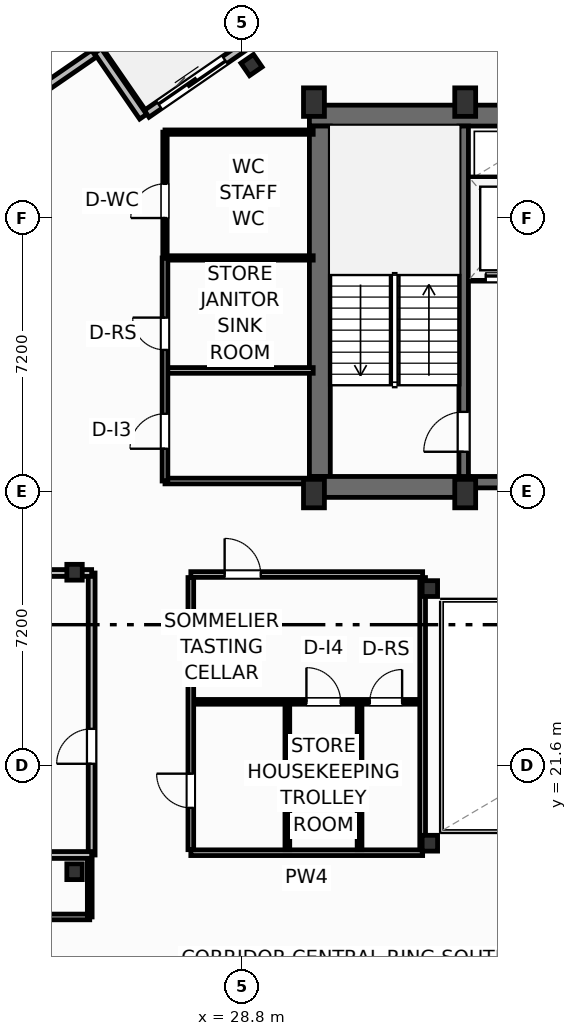
"""IFC4 building model, lengths in metres.
Left out: names, types, materials, properties, quantities, classifications, styles, units other than length and angle.
Written with IfcOpenShell. Run it as: python <this file> out.ifc"""

import sys

from ifc_helpers import new_model, si_unit, direction, frame, frame_2d, origin, origin_2d, place, context, subcontext, project, spatial, rectangle, i_section, extrude, element, fill, save


model = new_model("IFC4")
c1 = context("Model", 3, precision=1e-05, world=origin(), true_north=direction((0.0, 1.0)))
c2 = subcontext(c1, "Body", "Model", "MODEL_VIEW")
j1 = project(units=[si_unit("LENGTHUNIT", "METRE"), si_unit("PLANEANGLEUNIT", "RADIAN")], contexts=[c1])
p1 = place(None, origin())
s1 = spatial("IfcSite", under=j1, at=p1, CompositionType="ELEMENT")
p2 = place(p1, origin())
s2 = spatial("IfcBuilding", under=s1, at=p2, CompositionType="ELEMENT")
p3 = place(p2, frame((0.0, 0.0, 258.2)))
s3 = spatial("IfcBuildingStorey", under=s2, at=p3, CompositionType="ELEMENT", Elevation=258.2)
for number, where, z_axis, x_axis in (
    (1, (30.7, 28.75, 0.0), (0.0, 0.0, 1.0), (1.0, 0.0, 0.0)),
    (2, (34.68, 28.75, 0.0), (0.0, 0.0, 1.0), (1.0, 0.0, 0.0)),
    (3, (30.7, 39.05, 0.0), (0.0, 0.0, 1.0), (1.0, 0.0, 0.0)),
    (4, (34.68, 39.05, 0.0), (0.0, 0.0, 1.0), (1.0, 0.0, 0.0)),
):
    element("IfcColumn", number, at=place(p3, frame(where, z_axis=z_axis, x_axis=x_axis)), inside=s3, PredefinedType="COLUMN", context=c2, shape_type="SweptSolid", body=[
        extrude(rectangle(XDim=0.55, YDim=0.75, at=origin_2d()), origin(), (0.0, 0.0, 1.0), 3.7),
    ])
for number, where, z_axis, x_axis in (
    (5, (33.75, 19.55, 0.0), (0.0, 0.0, 1.0), (1.0, 0.0, 0.0)),
    (6, (33.75, 26.25, 0.0), (0.0, 0.0, 1.0), (1.0, 0.0, 0.0)),
    (7, (24.4, 18.8, 0.0), (0.0, 0.0, 1.0), (1.0, 0.0, 0.0)),
    (8, (24.4, 26.68, 0.0), (0.0, 0.0, 1.0), (1.0, 0.0, 0.0)),
):
    element("IfcColumn", number, at=place(p3, frame(where, z_axis=z_axis, x_axis=x_axis)), inside=s3, PredefinedType="COLUMN", context=c2, shape_type="SweptSolid", body=[
        extrude(i_section(OverallWidth=0.406, OverallDepth=0.416, WebThickness=0.03, FlangeThickness=0.048, FilletRadius=0.025, at=origin_2d()), origin(), (0.0, 0.0, 1.0), 3.7),
    ])
p4 = place(p3, frame((30.58, 38.695, 0.0), z_axis=(0.0, 0.0, 1.0), x_axis=(1.0, 0.0, 0.0)))
e9 = element("IfcWall", 9, at=p4, inside=s3, PredefinedType="SHEAR", context=c2, shape_type="SweptSolid", body=[
    extrude(rectangle(XDim=17.24, YDim=0.55, at=frame_2d((8.62, 0.0))), origin(), (0.0, 0.0, 1.0), 3.45),
])
p5 = place(p3, frame((30.855, 29.2, 0.0), z_axis=(0.0, 0.0, 1.0), x_axis=(0.0, 1.0, 0.0)))
e10 = element("IfcWall", 10, at=p5, inside=s3, PredefinedType="SHEAR", context=c2, shape_type="SweptSolid", body=[
    extrude(rectangle(XDim=9.22, YDim=0.55, at=frame_2d((4.61, 0.0))), origin(), (0.0, 0.0, 1.0), 3.45),
])
p6 = place(p3, frame((30.58, 28.925, 0.0), z_axis=(0.0, 0.0, 1.0), x_axis=(1.0, 0.0, 0.0)))
e11 = element("IfcWall", 11, at=p6, inside=s3, PredefinedType="SHEAR", context=c2, shape_type="SweptSolid", body=[
    extrude(rectangle(XDim=4.22, YDim=0.55, at=frame_2d((2.11, 0.0))), origin(), (0.0, 0.0, 1.0), 3.45),
])
p7 = place(p3, frame((34.8, 29.05, 0.0), z_axis=(0.0, 0.0, 1.0), x_axis=(1.0, 0.0, 0.0)))
e12 = element("IfcWall", 12, at=p7, inside=s3, PredefinedType="SHEAR", context=c2, shape_type="SweptSolid", body=[
    extrude(rectangle(XDim=8.8, YDim=0.3, at=frame_2d((4.4, 0.0))), origin(), (0.0, 0.0, 1.0), 3.45),
])
p8 = place(p7, frame((0.95, 0.0, 0.0)))
e13 = element("IfcOpeningElement", 13, at=p8, cuts=e12, PredefinedType="OPENING", context=c2, shape_type="SweptSolid", body=[
    extrude(rectangle(XDim=1.1, YDim=2.15, at=frame_2d((0.55, 1.075))), frame((0.0, 0.16, 0.0), z_axis=(0.0, -1.0, 0.0), x_axis=(1.0, 0.0, 0.0)), (0.0, 0.0, 1.0), 0.32),
])
p9 = place(p7, frame((6.75, 0.0, 0.0)))
e14 = element("IfcOpeningElement", 14, at=p9, cuts=e12, PredefinedType="OPENING", context=c2, shape_type="SweptSolid", body=[
    extrude(rectangle(XDim=1.1, YDim=2.15, at=frame_2d((0.55, 1.075))), frame((0.0, 0.16, 0.0), z_axis=(0.0, -1.0, 0.0), x_axis=(1.0, 0.0, 0.0)), (0.0, 0.0, 1.0), 0.32),
])
p10 = place(p7, frame((4.45, 0.0, 0.0)))
e15 = element("IfcOpeningElement", 15, at=p10, cuts=e12, PredefinedType="OPENING", context=c2, shape_type="SweptSolid", body=[
    extrude(rectangle(XDim=0.95, YDim=2.15, at=frame_2d((0.475, 1.075))), frame((0.0, 0.16, 0.0), z_axis=(0.0, -1.0, 0.0), x_axis=(1.0, 0.0, 0.0)), (0.0, 0.0, 1.0), 0.32),
])
p11 = place(p3, frame((34.64, 29.2, 0.0), z_axis=(0.0, 0.0, 1.0), x_axis=(0.0, 1.0, 0.0)))
e16 = element("IfcWall", 16, at=p11, inside=s3, PredefinedType="SHEAR", context=c2, shape_type="SweptSolid", body=[
    extrude(rectangle(XDim=9.22, YDim=0.25, at=frame_2d((4.61, 0.0))), origin(), (0.0, 0.0, 1.0), 3.45),
])
p12 = place(p11, frame((0.65, 0.0, 0.0)))
e17 = element("IfcOpeningElement", 17, at=p12, cuts=e16, PredefinedType="OPENING", context=c2, shape_type="SweptSolid", body=[
    extrude(rectangle(XDim=1.05, YDim=2.15, at=frame_2d((0.525, 1.075))), frame((0.0, 0.135, 0.0), z_axis=(0.0, -1.0, 0.0), x_axis=(1.0, 0.0, 0.0)), (0.0, 0.0, 1.0), 0.27),
])
p13 = place(p3, frame((29.057, 40.025, 0.0), z_axis=(0.0, 0.0, 1.0), x_axis=(0.823532597628, 0.567268949127, 0.0)))
e18 = element("IfcColumn", 18, at=p13, inside=s3, PredefinedType="COLUMN", context=c2, shape_type="SweptSolid", body=[
    extrude(i_section(OverallWidth=0.401, OverallDepth=0.399, WebThickness=0.025, FlangeThickness=0.04, FilletRadius=0.022, at=origin_2d()), origin(), (0.0, 0.0, 1.0), 3.7),
])
p14 = place(p3, frame((26.297, 38.743, 0.0), z_axis=(0.0, 0.0, 1.0), x_axis=(0.823534636215, 0.567265989598, 0.0)))
e19 = element("IfcWall", 19, at=p14, inside=s3, PredefinedType="SOLIDWALL", context=c2, shape_type="SweptSolid", body=[
    extrude(rectangle(XDim=6.0, YDim=0.22, at=frame_2d((3.0, 0.0))), origin(), (0.0, 0.0, 1.0), 2.73),
])
p15 = place(p14, frame((0.4, 0.0, 0.0)))
e20 = element("IfcOpeningElement", 20, at=p15, cuts=e19, PredefinedType="OPENING", context=c2, shape_type="SweptSolid", body=[
    extrude(rectangle(XDim=2.1, YDim=2.3, at=frame_2d((1.05, 1.15))), frame((0.0, 0.12, 0.0), z_axis=(0.0, -1.0, 0.0), x_axis=(1.0, 0.0, 0.0)), (0.0, 0.0, 1.0), 0.24),
])
p16 = place(p3, frame((26.204, 38.667, 0.0), z_axis=(0.0, 0.0, 1.0), x_axis=(-0.567219383419, 0.823566737474, 0.0)))
e21 = element("IfcWall", 21, at=p16, inside=s3, PredefinedType="SOLIDWALL", context=c2, shape_type="SweptSolid", body=[
    extrude(rectangle(XDim=2.1, YDim=0.22, at=frame_2d((1.05, 0.0))), origin(), (0.0, 0.0, 1.0), 2.73),
])
p17 = place(p3, frame((24.91, 40.325, 0.0), z_axis=(0.0, 0.0, 1.0), x_axis=(-0.823521165086, -0.56728554596, 0.0)))
e22 = element("IfcWall", 22, at=p17, inside=s3, PredefinedType="SOLIDWALL", context=c2, shape_type="SweptSolid", body=[
    extrude(rectangle(XDim=8.035, YDim=0.22, at=frame_2d((4.018, 0.0))), origin(), (0.0, 0.0, 1.0), 2.73),
])
p18 = place(p17, frame((2.968, 0.0, 0.8)))
e23 = element("IfcOpeningElement", 23, at=p18, cuts=e22, PredefinedType="OPENING", context=c2, shape_type="SweptSolid", body=[
    extrude(rectangle(XDim=2.1, YDim=1.75, at=frame_2d((1.05, 0.875))), frame((0.0, 0.12, 0.0), z_axis=(0.0, -1.0, 0.0), x_axis=(1.0, 0.0, 0.0)), (0.0, 0.0, 1.0), 0.24),
])
p19 = place(p3, frame((5.0, 17.61, 0.0), z_axis=(0.0, 0.0, 1.0), x_axis=(1.0, 0.0, 0.0)))
e24 = element("IfcWall", 24, at=p19, inside=s3, PredefinedType="PARTITIONING", context=c2, shape_type="SweptSolid", body=[
    extrude(rectangle(XDim=19.8, YDim=0.15, at=frame_2d((9.9, 0.0))), origin(), (0.0, 0.0, 1.0), 2.739),
])
p20 = place(p19, frame((16.335, 0.0, 0.0)))
e25 = element("IfcOpeningElement", 25, at=p20, cuts=e24, PredefinedType="OPENING", context=c2, shape_type="SweptSolid", body=[
    extrude(rectangle(XDim=0.92, YDim=2.05, at=frame_2d((0.46, 1.025))), frame((0.0, 0.085, 0.0), z_axis=(0.0, -1.0, 0.0), x_axis=(1.0, 0.0, 0.0)), (0.0, 0.0, 1.0), 0.17),
])
p21 = place(p3, frame((24.8, 17.61, 0.0), z_axis=(0.0, 0.0, 1.0), x_axis=(0.0, 1.0, 0.0)))
e26 = element("IfcWall", 26, at=p21, inside=s3, PredefinedType="PARTITIONING", context=c2, shape_type="SweptSolid", body=[
    extrude(rectangle(XDim=1.63, YDim=0.125, at=frame_2d((0.815, 0.0))), origin(), (0.0, 0.0, 1.0), 3.45),
])
p22 = place(p3, frame((24.85, 19.24, 0.0), z_axis=(0.0, 0.0, 1.0), x_axis=(0.0, 1.0, 0.0)))
e27 = element("IfcWall", 27, at=p22, inside=s3, PredefinedType="PARTITIONING", context=c2, shape_type="SweptSolid", body=[
    extrude(rectangle(XDim=7.42, YDim=0.18, at=frame_2d((3.71, 0.0))), origin(), (0.0, 0.0, 1.0), 3.45),
])
p23 = place(p22, frame((2.4, 0.0, 0.0)))
e28 = element("IfcOpeningElement", 28, at=p23, cuts=e27, PredefinedType="OPENING", context=c2, shape_type="SweptSolid", body=[
    extrude(rectangle(XDim=0.92, YDim=2.05, at=frame_2d((0.46, 1.025))), frame((0.0, 0.1, 0.0), z_axis=(0.0, -1.0, 0.0), x_axis=(1.0, 0.0, 0.0)), (0.0, 0.0, 1.0), 0.2),
])
p24 = place(p3, frame((19.2, 19.24, 0.0), z_axis=(0.0, 0.0, 1.0), x_axis=(1.0, 0.0, 0.0)))
e29 = element("IfcWall", 29, at=p24, inside=s3, PredefinedType="PARTITIONING", context=c2, shape_type="SweptSolid", body=[
    extrude(rectangle(XDim=5.65, YDim=0.18, at=frame_2d((2.825, 0.0))), origin(), (0.0, 0.0, 1.0), 3.45),
])
p25 = place(p3, frame((5.107, 26.66, 0.0), z_axis=(0.0, 0.0, 1.0), x_axis=(1.0, 0.0, 0.0)))
e30 = element("IfcWall", 30, at=p25, inside=s3, PredefinedType="PARTITIONING", context=c2, shape_type="SweptSolid", body=[
    extrude(rectangle(XDim=19.743, YDim=0.18, at=frame_2d((9.872, 0.0))), origin(), (0.0, 0.0, 1.0), 2.662),
])
p26 = place(p3, frame((34.8, 34.44, 0.0), z_axis=(0.0, 0.0, 1.0), x_axis=(1.0, 0.0, 0.0)))
e31 = element("IfcWall", 31, at=p26, inside=s3, PredefinedType="PARTITIONING", context=c2, shape_type="SweptSolid", body=[
    extrude(rectangle(XDim=2.18, YDim=0.2, at=frame_2d((1.09, 0.0))), origin(), (0.0, 0.0, 1.0), 3.45),
])
p27 = place(p26, frame((0.42, 0.0, 0.0)))
e32 = element("IfcOpeningElement", 32, at=p27, cuts=e31, PredefinedType="OPENING", context=c2, shape_type="SweptSolid", body=[
    extrude(rectangle(XDim=1.2, YDim=2.2, at=frame_2d((0.6, 1.1))), frame((0.0, 0.11, 0.0), z_axis=(0.0, -1.0, 0.0), x_axis=(1.0, 0.0, 0.0)), (0.0, 0.0, 1.0), 0.22),
])
p28 = place(p3, frame((34.8, 36.98, 0.0), z_axis=(0.0, 0.0, 1.0), x_axis=(1.0, 0.0, 0.0)))
e33 = element("IfcWall", 33, at=p28, inside=s3, PredefinedType="PARTITIONING", context=c2, shape_type="SweptSolid", body=[
    extrude(rectangle(XDim=2.18, YDim=0.2, at=frame_2d((1.09, 0.0))), origin(), (0.0, 0.0, 1.0), 3.45),
])
p29 = place(p3, frame((27.46, 26.62, 0.0), z_axis=(0.0, 0.0, 1.0), x_axis=(1.0, 0.0, 0.0)))
e34 = element("IfcWall", 34, at=p29, inside=s3, PredefinedType="PARTITIONING", context=c2, shape_type="SweptSolid", body=[
    extrude(rectangle(XDim=6.1, YDim=0.15, at=frame_2d((3.05, 0.0))), origin(), (0.0, 0.0, 1.0), 2.662),
])
p30 = place(p29, frame((0.89, 0.0, 0.0)))
e35 = element("IfcOpeningElement", 35, at=p30, cuts=e34, PredefinedType="OPENING", context=c2, shape_type="SweptSolid", body=[
    extrude(rectangle(XDim=0.95, YDim=2.05, at=frame_2d((0.475, 1.025))), frame((0.0, 0.085, 0.0), z_axis=(0.0, -1.0, 0.0), x_axis=(1.0, 0.0, 0.0)), (0.0, 0.0, 1.0), 0.17),
])
p31 = place(p3, frame((27.46, 19.3, 0.0), z_axis=(0.0, 0.0, 1.0), x_axis=(1.0, 0.0, 0.0)))
e36 = element("IfcWall", 36, at=p31, inside=s3, PredefinedType="PARTITIONING", context=c2, shape_type="SweptSolid", body=[
    extrude(rectangle(XDim=6.1, YDim=0.15, at=frame_2d((3.05, 0.0))), origin(), (0.0, 0.0, 1.0), 2.662),
])
p32 = place(p3, frame((27.52, 23.27, 0.0), z_axis=(0.0, 0.0, 1.0), x_axis=(1.0, 0.0, 0.0)))
e37 = element("IfcWall", 37, at=p32, inside=s3, PredefinedType="PARTITIONING", context=c2, shape_type="SweptSolid", body=[
    extrude(rectangle(XDim=6.0, YDim=0.125, at=frame_2d((3.0, 0.0))), origin(), (0.0, 0.0, 1.0), 3.45),
])
p33 = place(p32, frame((2.982, 0.0, 0.0)))
e38 = element("IfcOpeningElement", 38, at=p33, cuts=e37, PredefinedType="OPENING", context=c2, shape_type="SweptSolid", body=[
    extrude(rectangle(XDim=0.9, YDim=2.05, at=frame_2d((0.45, 1.025))), frame((0.0, 0.073, 0.0), z_axis=(0.0, -1.0, 0.0), x_axis=(1.0, 0.0, 0.0)), (0.0, 0.0, 1.0), 0.145),
])
p34 = place(p32, frame((4.65, 0.0, 0.0)))
e39 = element("IfcOpeningElement", 39, at=p34, cuts=e37, PredefinedType="OPENING", context=c2, shape_type="SweptSolid", body=[
    extrude(rectangle(XDim=0.85, YDim=2.05, at=frame_2d((0.425, 1.025))), frame((0.0, 0.073, 0.0), z_axis=(0.0, -1.0, 0.0), x_axis=(1.0, 0.0, 0.0)), (0.0, 0.0, 1.0), 0.145),
])
for number, where, z_axis, x_axis in (
    (40, (30.0, 19.38, 0.0), (0.0, 0.0, 1.0), (0.0, 1.0, 0.0)),
    (41, (31.9, 19.38, 0.0), (0.0, 0.0, 1.0), (0.0, 1.0, 0.0)),
):
    element("IfcWall", number, at=place(p3, frame(where, z_axis=z_axis, x_axis=x_axis)), inside=s3, PredefinedType="PARTITIONING", context=c2, shape_type="SweptSolid", body=[
        extrude(rectangle(XDim=3.82, YDim=0.125, at=frame_2d((1.91, 0.0))), origin(), (0.0, 0.0, 1.0), 3.45),
    ])
p35 = place(p3, frame((27.46, 19.38, 0.0), z_axis=(0.0, 0.0, 1.0), x_axis=(0.0, 1.0, 0.0)))
e42 = element("IfcWall", 42, at=p35, inside=s3, PredefinedType="PARTITIONING", context=c2, shape_type="SweptSolid", body=[
    extrude(rectangle(XDim=7.16, YDim=0.15, at=frame_2d((3.58, 0.0))), origin(), (0.0, 0.0, 1.0), 3.45),
])
p36 = place(p35, frame((1.1, 0.0, 0.0)))
e43 = element("IfcOpeningElement", 43, at=p36, cuts=e42, PredefinedType="OPENING", context=c2, shape_type="SweptSolid", body=[
    extrude(rectangle(XDim=0.9, YDim=2.05, at=frame_2d((0.45, 1.025))), frame((0.0, 0.085, 0.0), z_axis=(0.0, -1.0, 0.0), x_axis=(1.0, 0.0, 0.0)), (0.0, 0.0, 1.0), 0.17),
])
p37 = place(p3, frame((33.56, 19.38, 0.0), z_axis=(0.0, 0.0, 1.0), x_axis=(0.0, 1.0, 0.0)))
e44 = element("IfcWall", 44, at=p37, inside=s3, PredefinedType="PARTITIONING", context=c2, shape_type="SweptSolid", body=[
    extrude(rectangle(XDim=7.16, YDim=0.15, at=frame_2d((3.58, 0.0))), origin(), (0.0, 0.0, 1.0), 2.824),
])
p38 = place(p3, frame((26.78, 29.08, 0.0), z_axis=(0.0, 0.0, 1.0), x_axis=(1.0, 0.0, 0.0)))
e45 = element("IfcWall", 45, at=p38, inside=s3, PredefinedType="PARTITIONING", context=c2, shape_type="SweptSolid", body=[
    extrude(rectangle(XDim=3.8, YDim=0.15, at=frame_2d((1.9, 0.0))), origin(), (0.0, 0.0, 1.0), 3.45),
])
p39 = place(p3, frame((26.8, 31.99, 0.0), z_axis=(0.0, 0.0, 1.0), x_axis=(1.0, 0.0, 0.0)))
e46 = element("IfcWall", 46, at=p39, inside=s3, PredefinedType="PARTITIONING", context=c2, shape_type="SweptSolid", body=[
    extrude(rectangle(XDim=3.88, YDim=0.15, at=frame_2d((1.94, 0.0))), origin(), (0.0, 0.0, 1.0), 3.45),
])
p40 = place(p3, frame((26.8, 34.95, 0.0), z_axis=(0.0, 0.0, 1.0), x_axis=(1.0, 0.0, 0.0)))
e47 = element("IfcWall", 47, at=p40, inside=s3, PredefinedType="PARTITIONING", context=c2, shape_type="SweptSolid", body=[
    extrude(rectangle(XDim=3.88, YDim=0.115, at=frame_2d((1.94, 0.0))), origin(), (0.0, 0.0, 1.0), 3.45),
])
p41 = place(p3, frame((26.78, 38.26, 0.0), z_axis=(0.0, 0.0, 1.0), x_axis=(1.0, 0.0, 0.0)))
e48 = element("IfcWall", 48, at=p41, inside=s3, PredefinedType="PARTITIONING", context=c2, shape_type="SweptSolid", body=[
    extrude(rectangle(XDim=3.9, YDim=0.115, at=frame_2d((1.95, 0.0))), origin(), (0.0, 0.0, 1.0), 3.45),
])
p42 = place(p3, frame((26.78, 29.08, 0.0), z_axis=(0.0, 0.0, 1.0), x_axis=(0.0, 1.0, 0.0)))
e49 = element("IfcWall", 49, at=p42, inside=s3, PredefinedType="PARTITIONING", context=c2, shape_type="SweptSolid", body=[
    extrude(rectangle(XDim=5.87, YDim=0.15, at=frame_2d((2.935, 0.0))), origin(), (0.0, 0.0, 1.0), 3.45),
])
p43 = place(p42, frame((0.85, 0.0, 0.0)))
e50 = element("IfcOpeningElement", 50, at=p43, cuts=e49, PredefinedType="OPENING", context=c2, shape_type="SweptSolid", body=[
    extrude(rectangle(XDim=0.92, YDim=2.05, at=frame_2d((0.46, 1.025))), frame((0.0, 0.085, 0.0), z_axis=(0.0, -1.0, 0.0), x_axis=(1.0, 0.0, 0.0)), (0.0, 0.0, 1.0), 0.17),
])
p44 = place(p42, frame((3.45, 0.0, 0.0)))
e51 = element("IfcOpeningElement", 51, at=p44, cuts=e49, PredefinedType="OPENING", context=c2, shape_type="SweptSolid", body=[
    extrude(rectangle(XDim=0.85, YDim=2.05, at=frame_2d((0.425, 1.025))), frame((0.0, 0.085, 0.0), z_axis=(0.0, -1.0, 0.0), x_axis=(1.0, 0.0, 0.0)), (0.0, 0.0, 1.0), 0.17),
])
p45 = place(p3, frame((26.78, 34.95, 0.0), z_axis=(0.0, 0.0, 1.0), x_axis=(0.0, 1.0, 0.0)))
e52 = element("IfcWall", 52, at=p45, inside=s3, PredefinedType="PARTITIONING", context=c2, shape_type="SweptSolid", body=[
    extrude(rectangle(XDim=3.31, YDim=0.115, at=frame_2d((1.655, 0.0))), origin(), (0.0, 0.0, 1.0), 3.45),
])
p46 = place(p45, frame((1.05, 0.0, 0.0)))
e53 = element("IfcOpeningElement", 53, at=p46, cuts=e52, PredefinedType="OPENING", context=c2, shape_type="SweptSolid", body=[
    extrude(rectangle(XDim=0.9, YDim=2.05, at=frame_2d((0.45, 1.025))), frame((0.0, 0.067, 0.0), z_axis=(0.0, -1.0, 0.0), x_axis=(1.0, 0.0, 0.0)), (0.0, 0.0, 1.0), 0.135),
])
p47 = place(p15, origin())
e54 = element("IfcDoor", 54, at=p47, inside=s3, OperationType="SLIDING_TO_LEFT", PredefinedType="DOOR", context=c2, shape_type="SweptSolid", body=[
    extrude(rectangle(XDim=2.1, YDim=2.3, at=frame_2d((1.05, 1.15))), frame((0.0, 0.025, 0.0), z_axis=(0.0, -1.0, 0.0), x_axis=(1.0, 0.0, 0.0)), (0.0, 0.0, 1.0), 0.05),
])
fill(e20, e54)
p48 = place(p23, origin())
e55 = element("IfcDoor", 55, at=p48, inside=s3, OperationType="SINGLE_SWING_LEFT", PredefinedType="DOOR", context=c2, shape_type="SweptSolid", body=[
    extrude(rectangle(XDim=0.92, YDim=2.05, at=frame_2d((0.46, 1.025))), frame((0.0, 0.025, 0.0), z_axis=(0.0, -1.0, 0.0), x_axis=(1.0, 0.0, 0.0)), (0.0, 0.0, 1.0), 0.05),
])
fill(e28, e55)
p49 = place(p12, origin())
e56 = element("IfcDoor", 56, at=p49, inside=s3, OperationType="SINGLE_SWING_LEFT", PredefinedType="DOOR", context=c2, shape_type="SweptSolid", body=[
    extrude(rectangle(XDim=1.05, YDim=2.15, at=frame_2d((0.525, 1.075))), frame((0.0, 0.025, 0.0), z_axis=(0.0, -1.0, 0.0), x_axis=(1.0, 0.0, 0.0)), (0.0, 0.0, 1.0), 0.05),
])
fill(e17, e56)
p50 = place(p27, origin())
e57 = element("IfcDoor", 57, at=p50, inside=s3, OperationType="SLIDING_TO_LEFT", PredefinedType="DOOR", context=c2, shape_type="SweptSolid", body=[
    extrude(rectangle(XDim=1.2, YDim=2.2, at=frame_2d((0.6, 1.1))), frame((0.0, 0.025, 0.0), z_axis=(0.0, -1.0, 0.0), x_axis=(1.0, 0.0, 0.0)), (0.0, 0.0, 1.0), 0.05),
])
fill(e32, e57)
p51 = place(p30, origin())
e58 = element("IfcDoor", 58, at=p51, inside=s3, OperationType="SINGLE_SWING_LEFT", PredefinedType="DOOR", context=c2, shape_type="SweptSolid", body=[
    extrude(rectangle(XDim=0.95, YDim=2.05, at=frame_2d((0.475, 1.025))), frame((0.0, 0.025, 0.0), z_axis=(0.0, -1.0, 0.0), x_axis=(1.0, 0.0, 0.0)), (0.0, 0.0, 1.0), 0.05),
])
fill(e35, e58)
p52 = place(p33, origin())
e59 = element("IfcDoor", 59, at=p52, inside=s3, OperationType="SINGLE_SWING_LEFT", PredefinedType="DOOR", context=c2, shape_type="SweptSolid", body=[
    extrude(rectangle(XDim=0.9, YDim=2.05, at=frame_2d((0.45, 1.025))), frame((0.0, 0.025, 0.0), z_axis=(0.0, -1.0, 0.0), x_axis=(1.0, 0.0, 0.0)), (0.0, 0.0, 1.0), 0.05),
])
fill(e38, e59)
p53 = place(p34, origin())
e60 = element("IfcDoor", 60, at=p53, inside=s3, OperationType="SINGLE_SWING_RIGHT", PredefinedType="DOOR", context=c2, shape_type="SweptSolid", body=[
    extrude(rectangle(XDim=0.85, YDim=2.05, at=frame_2d((0.425, 1.025))), frame((0.0, 0.025, 0.0), z_axis=(0.0, -1.0, 0.0), x_axis=(1.0, 0.0, 0.0)), (0.0, 0.0, 1.0), 0.05),
])
fill(e39, e60)
p54 = place(p36, origin())
e61 = element("IfcDoor", 61, at=p54, inside=s3, OperationType="SINGLE_SWING_RIGHT", PredefinedType="DOOR", context=c2, shape_type="SweptSolid", body=[
    extrude(rectangle(XDim=0.9, YDim=2.05, at=frame_2d((0.45, 1.025))), frame((0.0, 0.025, 0.0), z_axis=(0.0, -1.0, 0.0), x_axis=(1.0, 0.0, 0.0)), (0.0, 0.0, 1.0), 0.05),
])
fill(e43, e61)
p55 = place(p43, origin())
e62 = element("IfcDoor", 62, at=p55, inside=s3, OperationType="SINGLE_SWING_LEFT", PredefinedType="DOOR", context=c2, shape_type="SweptSolid", body=[
    extrude(rectangle(XDim=0.92, YDim=2.05, at=frame_2d((0.46, 1.025))), frame((0.0, 0.025, 0.0), z_axis=(0.0, -1.0, 0.0), x_axis=(1.0, 0.0, 0.0)), (0.0, 0.0, 1.0), 0.05),
])
fill(e50, e62)
p56 = place(p44, origin())
e63 = element("IfcDoor", 63, at=p56, inside=s3, OperationType="SINGLE_SWING_RIGHT", PredefinedType="DOOR", context=c2, shape_type="SweptSolid", body=[
    extrude(rectangle(XDim=0.85, YDim=2.05, at=frame_2d((0.425, 1.025))), frame((0.0, 0.025, 0.0), z_axis=(0.0, -1.0, 0.0), x_axis=(1.0, 0.0, 0.0)), (0.0, 0.0, 1.0), 0.05),
])
fill(e51, e63)
p57 = place(p46, origin())
e64 = element("IfcDoor", 64, at=p57, inside=s3, OperationType="SINGLE_SWING_LEFT", PredefinedType="DOOR", context=c2, shape_type="SweptSolid", body=[
    extrude(rectangle(XDim=0.9, YDim=2.05, at=frame_2d((0.45, 1.025))), frame((0.0, 0.025, 0.0), z_axis=(0.0, -1.0, 0.0), x_axis=(1.0, 0.0, 0.0)), (0.0, 0.0, 1.0), 0.05),
])
fill(e53, e64)
save(model, sys.argv[1])
